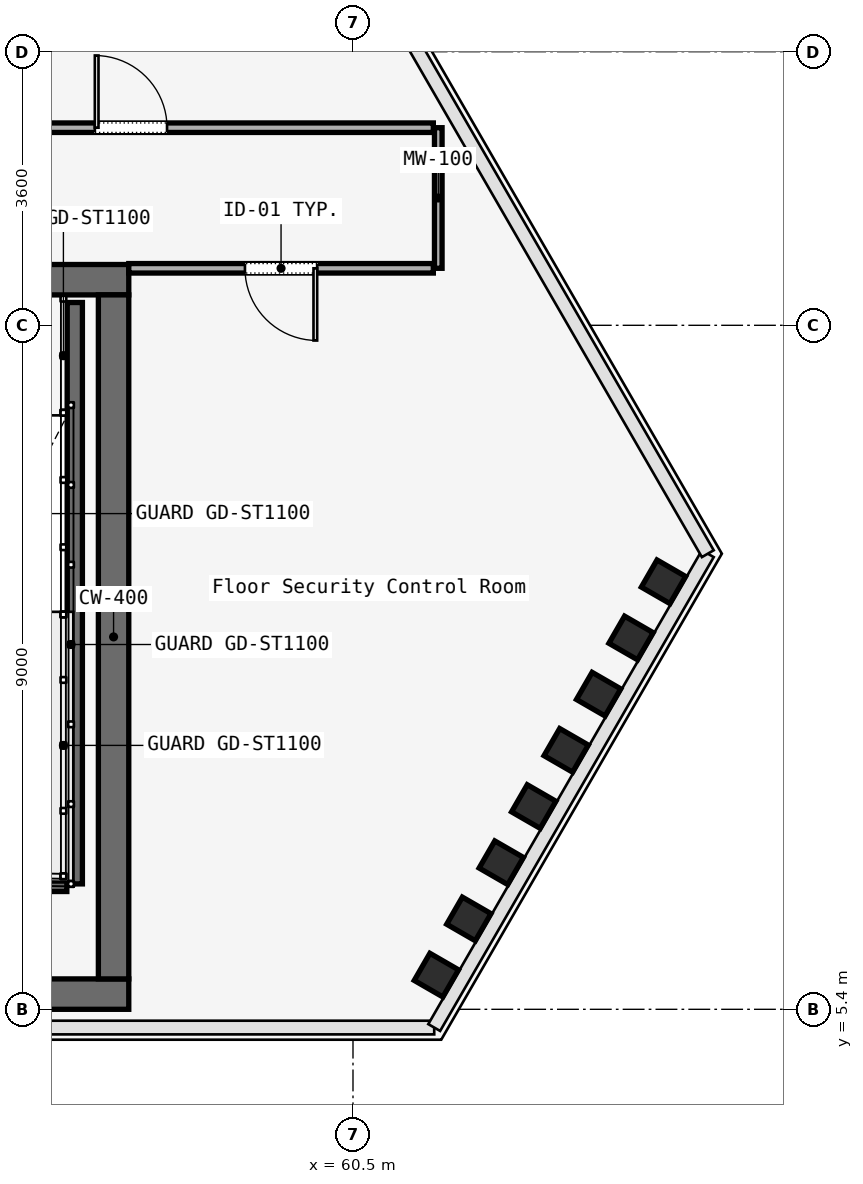
"""IFC4 building model, lengths in metres.
Left out: names, types, materials, properties, quantities, classifications, styles, units other than length and angle.
Written with IfcOpenShell. Run it as: python <this file> out.ifc"""

import sys

from ifc_helpers import new_model, si_unit, direction, frame, frame_2d, origin, origin_2d, place, context, subcontext, project, spatial, rectangle, i_section, extrude, element, fill, save


model = new_model("IFC4")
c1 = context("Model", 3, precision=1e-05, world=origin(), true_north=direction((0.0, 1.0)))
c2 = subcontext(c1, "Body", "Model", "MODEL_VIEW")
j1 = project(units=[si_unit("LENGTHUNIT", "METRE"), si_unit("PLANEANGLEUNIT", "RADIAN")], contexts=[c1])
p1 = place(None, origin())
s1 = spatial("IfcSite", under=j1, at=p1, CompositionType="ELEMENT")
p2 = place(p1, origin())
s2 = spatial("IfcBuilding", under=s1, at=p2, CompositionType="ELEMENT")
p3 = place(p2, frame((0.0, 0.0, 229.4)))
s3 = spatial("IfcBuildingStorey", under=s2, at=p3, CompositionType="ELEMENT", Elevation=229.4)
p4 = place(p3, frame((26.45, 15.0, 0.0), z_axis=(0.0, 0.0, 1.0), x_axis=(1.0, 0.0, 0.0)))
e1 = element("IfcWall", 1, at=p4, inside=s3, PredefinedType="SOLIDWALL", context=c2, shape_type="SweptSolid", body=[
    extrude(rectangle(XDim=31.1, YDim=0.4, at=frame_2d((15.55, 0.0))), origin(), (0.0, 0.0, 1.0), 3.58),
])
p5 = place(p4, frame((1.65, 0.0, 0.0)))
e2 = element("IfcOpeningElement", 2, at=p5, cuts=e1, PredefinedType="OPENING", context=c2, shape_type="SweptSolid", body=[
    extrude(rectangle(XDim=1.1, YDim=2.2, at=frame_2d((0.55, 1.1))), frame((0.0, 0.2, 0.0), z_axis=(0.0, -1.0, 0.0), x_axis=(1.0, 0.0, 0.0)), (0.0, 0.0, 1.0), 0.4),
])
p6 = place(p4, frame((13.65, 0.0, 0.0)))
e3 = element("IfcOpeningElement", 3, at=p6, cuts=e1, PredefinedType="OPENING", context=c2, shape_type="SweptSolid", body=[
    extrude(rectangle(XDim=1.1, YDim=2.2, at=frame_2d((0.55, 1.1))), frame((0.0, 0.2, 0.0), z_axis=(0.0, -1.0, 0.0), x_axis=(1.0, 0.0, 0.0)), (0.0, 0.0, 1.0), 0.4),
])
p7 = place(p4, frame((25.55, 0.0, 0.0)))
e4 = element("IfcOpeningElement", 4, at=p7, cuts=e1, PredefinedType="OPENING", context=c2, shape_type="SweptSolid", body=[
    extrude(rectangle(XDim=1.1, YDim=2.2, at=frame_2d((0.55, 1.1))), frame((0.0, 0.2, 0.0), z_axis=(0.0, -1.0, 0.0), x_axis=(1.0, 0.0, 0.0)), (0.0, 0.0, 1.0), 0.4),
])
p8 = place(p4, frame((19.35, 0.0, 0.0)))
e5 = element("IfcOpeningElement", 5, at=p8, cuts=e1, PredefinedType="OPENING", context=c2, shape_type="SweptSolid", body=[
    extrude(rectangle(XDim=1.1, YDim=2.2, at=frame_2d((0.55, 1.1))), frame((0.0, 0.2, 0.0), z_axis=(0.0, -1.0, 0.0), x_axis=(1.0, 0.0, 0.0)), (0.0, 0.0, 1.0), 0.4),
])
p9 = place(p4, frame((21.4, 0.0, 0.0)))
e6 = element("IfcOpeningElement", 6, at=p9, cuts=e1, PredefinedType="OPENING", context=c2, shape_type="SweptSolid", body=[
    extrude(rectangle(XDim=0.9, YDim=2.1, at=frame_2d((0.45, 1.05))), frame((0.0, 0.2, 0.0), z_axis=(0.0, -1.0, 0.0), x_axis=(1.0, 0.0, 0.0)), (0.0, 0.0, 1.0), 0.4),
])
p10 = place(p4, frame((5.54, 0.0, 0.0)))
e7 = element("IfcOpeningElement", 7, at=p10, cuts=e1, PredefinedType="OPENING", context=c2, shape_type="SweptSolid", body=[
    extrude(rectangle(XDim=0.95, YDim=2.2, at=frame_2d((0.475, 1.1))), frame((0.0, 0.2, 0.0), z_axis=(0.0, -1.0, 0.0), x_axis=(1.0, 0.0, 0.0)), (0.0, 0.0, 1.0), 0.4),
])
p11 = place(p4, frame((9.49, 0.0, 0.0)))
e8 = element("IfcOpeningElement", 8, at=p11, cuts=e1, PredefinedType="OPENING", context=c2, shape_type="SweptSolid", body=[
    extrude(rectangle(XDim=0.95, YDim=2.2, at=frame_2d((0.475, 1.1))), frame((0.0, 0.2, 0.0), z_axis=(0.0, -1.0, 0.0), x_axis=(1.0, 0.0, 0.0)), (0.0, 0.0, 1.0), 0.4),
])
p12 = place(p4, frame((23.35, 0.0, 0.0)))
e9 = element("IfcOpeningElement", 9, at=p12, cuts=e1, PredefinedType="OPENING", context=c2, shape_type="SweptSolid", body=[
    extrude(rectangle(XDim=1.3, YDim=2.3, at=frame_2d((0.65, 1.15))), frame((0.0, 0.2, 0.0), z_axis=(0.0, -1.0, 0.0), x_axis=(1.0, 0.0, 0.0)), (0.0, 0.0, 1.0), 0.4),
])
p13 = place(p3, frame((26.45, 5.6, 0.0), z_axis=(0.0, 0.0, 1.0), x_axis=(1.0, 0.0, 0.0)))
e10 = element("IfcWall", 10, at=p13, inside=s3, PredefinedType="SOLIDWALL", context=c2, shape_type="SweptSolid", body=[
    extrude(rectangle(XDim=31.1, YDim=0.4, at=frame_2d((15.55, 0.0))), origin(), (0.0, 0.0, 1.0), 3.58),
])
p14 = place(p3, frame((57.35, 5.8, 0.0), z_axis=(0.0, 0.0, 1.0), x_axis=(0.0, 1.0, 0.0)))
e11 = element("IfcWall", 11, at=p14, inside=s3, PredefinedType="SOLIDWALL", context=c2, shape_type="SweptSolid", body=[
    extrude(rectangle(XDim=9.0, YDim=0.4, at=frame_2d((4.5, 0.0))), origin(), (0.0, 0.0, 1.0), 3.58),
])
for number, where, z_axis, x_axis in (
    (12, (61.597, 5.85, 0.0), (0.0, 0.0, 1.0), (0.5, 0.866, 0.0)),
    (13, (62.024, 6.589, 0.0), (0.0, 0.0, 1.0), (0.5, 0.866, 0.0)),
    (14, (62.451, 7.328, 0.0), (0.0, 0.0, 1.0), (0.5, 0.866, 0.0)),
    (15, (62.878, 8.068, 0.0), (0.0, 0.0, 1.0), (0.5, 0.866, 0.0)),
    (16, (63.305, 8.807, 0.0), (0.0, 0.0, 1.0), (0.5, 0.866, 0.0)),
    (17, (63.732, 9.546, 0.0), (0.0, 0.0, 1.0), (0.5, 0.866, 0.0)),
    (18, (64.158, 10.286, 0.0), (0.0, 0.0, 1.0), (0.5, 0.866, 0.0)),
    (19, (64.585, 11.025, 0.0), (0.0, 0.0, 1.0), (0.5, 0.866, 0.0)),
):
    element("IfcColumn", number, at=place(p3, frame(where, z_axis=z_axis, x_axis=x_axis)), inside=s3, PredefinedType="COLUMN", context=c2, shape_type="SweptSolid", body=[
        extrude(i_section(OverallWidth=0.412, OverallDepth=0.435, WebThickness=0.036, FlangeThickness=0.044, FilletRadius=0.015, at=origin_2d()), origin(), (0.0, 0.0, 1.0), 3.58),
    ])
p15 = place(p3, frame((56.84, 14.7, 0.0), z_axis=(0.0, 0.0, 1.0), x_axis=(0.0, -1.0, 0.0)))
e20 = element("IfcWall", 20, at=p15, inside=s3, PredefinedType="SOLIDWALL", context=c2, shape_type="SweptSolid", body=[
    extrude(rectangle(XDim=7.65, YDim=0.2, at=frame_2d((3.825, 0.0))), origin(), (0.0, 0.0, 1.0), 3.8),
])
p16 = place(p3, frame((53.62, 7.05, 0.0), z_axis=(0.0, 0.0, 1.0), x_axis=(1.0, 0.0, 0.0)))
e21 = element("IfcWall", 21, at=p16, inside=s3, PredefinedType="SOLIDWALL", context=c2, shape_type="SweptSolid", body=[
    extrude(rectangle(XDim=3.115, YDim=0.2, at=frame_2d((1.558, 0.0))), origin(), (0.0, 0.0, 1.0), 3.8),
])
p17 = place(p3, frame((61.622, 17.0, 0.0), z_axis=(0.0, 0.0, 1.0), x_axis=(0.0, -1.0, 0.0)))
e22 = element("IfcWall", 22, at=p17, inside=s3, PredefinedType="MOVABLE", context=c2, shape_type="SweptSolid", body=[
    extrude(rectangle(XDim=1.85, YDim=0.1, at=frame_2d((0.925, 0.0))), origin(), (0.0, 0.0, 1.0), 3.01),
])
p18 = place(p3, frame((61.557, 15.15, 0.0), z_axis=(0.0, 0.0, 1.0), x_axis=(-1.0, 0.0, 0.0)))
e23 = element("IfcWall", 23, at=p18, inside=s3, PredefinedType="PARTITIONING", context=c2, shape_type="SweptSolid", body=[
    extrude(rectangle(XDim=4.007, YDim=0.125, at=frame_2d((2.003, 0.0))), origin(), (0.0, 0.0, 1.0), 3.01),
])
p19 = place(p18, frame((1.529, 0.0, 0.0)))
e24 = element("IfcOpeningElement", 24, at=p19, cuts=e23, PredefinedType="OPENING", context=c2, shape_type="SweptSolid", body=[
    extrude(rectangle(XDim=0.95, YDim=2.2, at=frame_2d((0.475, 1.1))), frame((0.0, 0.062, 0.0), z_axis=(0.0, -1.0, 0.0), x_axis=(1.0, 0.0, 0.0)), (0.0, 0.0, 1.0), 0.125),
])
p20 = place(p3, frame((53.6, 17.0, 0.0), z_axis=(0.0, 0.0, 1.0), x_axis=(1.0, 0.0, 0.0)))
e25 = element("IfcWall", 25, at=p20, inside=s3, PredefinedType="PARTITIONING", context=c2, shape_type="SweptSolid", body=[
    extrude(rectangle(XDim=7.957, YDim=0.125, at=frame_2d((3.979, 0.0))), origin(), (0.0, 0.0, 1.0), 3.01),
])
p21 = place(p20, frame((3.503, 0.0, 0.0)))
e26 = element("IfcOpeningElement", 26, at=p21, cuts=e25, PredefinedType="OPENING", context=c2, shape_type="SweptSolid", body=[
    extrude(rectangle(XDim=0.95, YDim=2.2, at=frame_2d((0.475, 1.1))), frame((0.0, 0.062, 0.0), z_axis=(0.0, -1.0, 0.0), x_axis=(1.0, 0.0, 0.0)), (0.0, 0.0, 1.0), 0.125),
])
p22 = place(p19, origin())
e27 = element("IfcDoor", 27, at=p22, inside=s3, OperationType="SINGLE_SWING_LEFT", PredefinedType="DOOR", context=c2, shape_type="SweptSolid", body=[
    extrude(rectangle(XDim=0.95, YDim=2.2, at=frame_2d((0.475, 1.1))), frame((0.0, 0.025, 0.0), z_axis=(0.0, -1.0, 0.0), x_axis=(1.0, 0.0, 0.0)), (0.0, 0.0, 1.0), 0.05),
])
fill(e24, e27)
p23 = place(p21, origin())
e28 = element("IfcDoor", 28, at=p23, inside=s3, OperationType="SINGLE_SWING_RIGHT", PredefinedType="DOOR", context=c2, shape_type="SweptSolid", body=[
    extrude(rectangle(XDim=0.95, YDim=2.2, at=frame_2d((0.475, 1.1))), frame((0.0, 0.025, 0.0), z_axis=(0.0, -1.0, 0.0), x_axis=(1.0, 0.0, 0.0)), (0.0, 0.0, 1.0), 0.05),
])
fill(e26, e28)
save(model, sys.argv[1])
